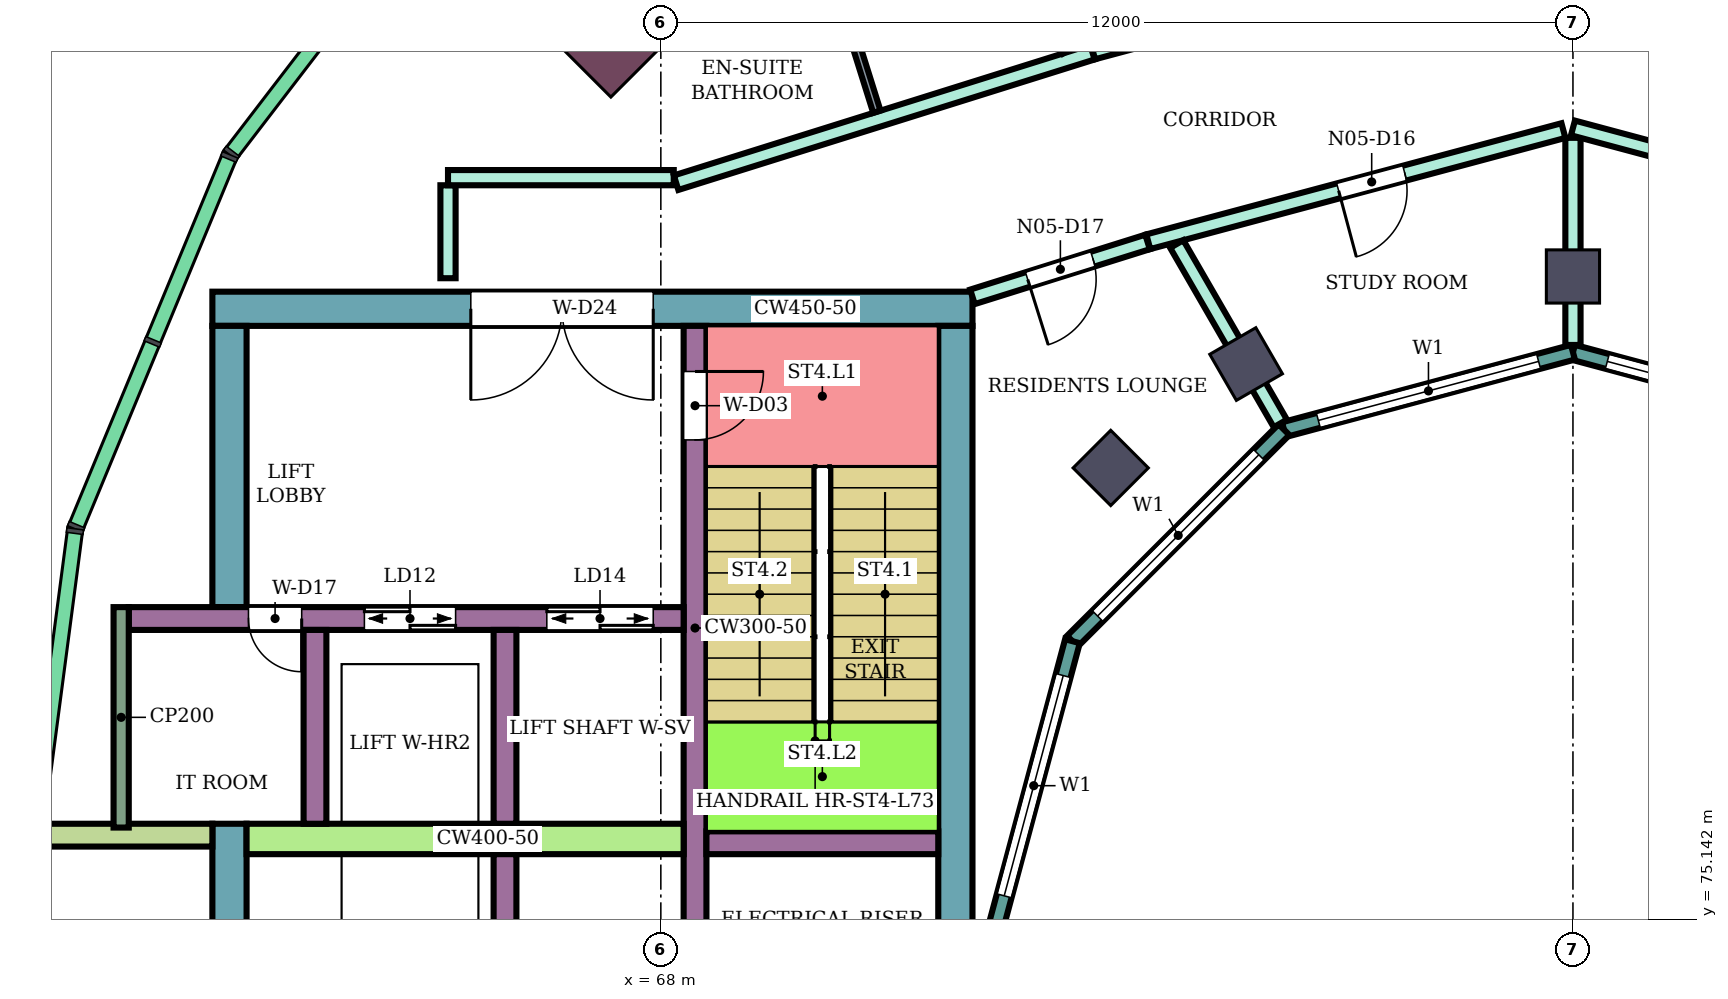
"""IFC4 building model, lengths in metres.
Left out: names, types, materials, properties, quantities, classifications, styles, units other than length and angle.
Written with IfcOpenShell. Run it as: python <this file> out.ifc"""

import sys

from ifc_helpers import new_model, si_unit, direction, frame, frame_2d, origin, origin_2d, place, context, subcontext, project, spatial, rectangle, extrude, element, fill, save


model = new_model("IFC4")
c1 = context("Model", 3, precision=1e-05, world=origin(), true_north=direction((0.0, 1.0)))
c2 = subcontext(c1, "Body", "Model", "MODEL_VIEW")
j1 = project(units=[si_unit("LENGTHUNIT", "METRE"), si_unit("PLANEANGLEUNIT", "RADIAN")], contexts=[c1])
p1 = place(None, origin())
s1 = spatial("IfcSite", under=j1, at=p1, CompositionType="ELEMENT")
p2 = place(p1, origin())
s2 = spatial("IfcBuilding", under=s1, at=p2, CompositionType="ELEMENT")
p3 = place(p2, frame((0.0, 0.0, 319.3)))
s3 = spatial("IfcBuildingStorey", under=s2, at=p3, CompositionType="ELEMENT", Elevation=319.3)
for number, where, z_axis, x_axis in (
    (1, (80.0, 83.6, 0.0), (0.0, 0.0, 1.0), (0.0, 1.0, 0.0)),
    (2, (75.7, 82.448, 0.0), (0.0, 0.0, 1.0), (-0.5, 0.866, 0.0)),
    (3, (73.919, 81.081, 0.0), (0.0, 0.0, 1.0), (-0.707, 0.707, 0.0)),
):
    element("IfcColumn", number, at=place(p3, frame(where, z_axis=z_axis, x_axis=x_axis)), inside=s3, PredefinedType="COLUMN", context=c2, shape_type="SweptSolid", body=[
        extrude(rectangle(XDim=0.7, YDim=0.7, at=origin_2d()), origin(), (0.0, 0.0, 1.0), 4.4),
    ])
p4 = place(p3, frame((67.767, 87.233, 0.0), z_axis=(0.0, 0.0, 1.0), x_axis=(-0.707106781187, 0.707106781187, 0.0)))
e4 = element("IfcColumn", 4, at=p4, inside=s3, PredefinedType="COLUMN", context=c2, shape_type="SweptSolid", body=[
    extrude(rectangle(XDim=1.2, YDim=2.4, at=origin_2d()), origin(), (0.0, 0.0, 1.0), 4.4),
])
p5 = place(p3, frame((72.1, 83.175, 0.0), z_axis=(0.0, 0.0, 1.0), x_axis=(-1.0, 0.0, 0.0)))
e5 = element("IfcWall", 5, at=p5, inside=s3, PredefinedType="SHEAR", context=c2, shape_type="SweptSolid", body=[
    extrude(rectangle(XDim=10.0, YDim=0.45, at=frame_2d((5.0, 0.0))), origin(), (0.0, 0.0, 1.0), 4.08),
])
p6 = place(p5, frame((4.2, 0.0, 0.0)))
e6 = element("IfcOpeningElement", 6, at=p6, cuts=e5, PredefinedType="OPENING", context=c2, shape_type="SweptSolid", body=[
    extrude(rectangle(XDim=2.4, YDim=2.4, at=frame_2d((1.2, 1.2))), frame((0.0, 0.235, 0.0), z_axis=(0.0, -1.0, 0.0), x_axis=(1.0, 0.0, 0.0)), (0.0, 0.0, 1.0), 0.47),
])
p7 = place(p3, frame((71.875, 82.95, 0.0), z_axis=(0.0, 0.0, 1.0), x_axis=(0.0, -1.0, 0.0)))
e7 = element("IfcWall", 7, at=p7, inside=s3, PredefinedType="SHEAR", context=c2, shape_type="SweptSolid", body=[
    extrude(rectangle(XDim=7.95, YDim=0.45, at=frame_2d((3.975, 0.0))), origin(), (0.0, 0.0, 1.0), 4.08),
])
p8 = place(p3, frame((62.325, 76.4, 0.0), z_axis=(0.0, 0.0, 1.0), x_axis=(0.0, -1.0, 0.0)))
e8 = element("IfcWall", 8, at=p8, inside=s3, PredefinedType="SHEAR", context=c2, shape_type="SweptSolid", body=[
    extrude(rectangle(XDim=9.35, YDim=0.45, at=frame_2d((4.675, 0.0))), origin(), (0.0, 0.0, 1.0), 4.08),
])
p9 = place(p3, frame((62.325, 82.95, 0.0), z_axis=(0.0, 0.0, 1.0), x_axis=(0.0, -1.0, 0.0)))
e9 = element("IfcWall", 9, at=p9, inside=s3, PredefinedType="SHEAR", context=c2, shape_type="SweptSolid", body=[
    extrude(rectangle(XDim=3.7, YDim=0.45, at=frame_2d((1.85, 0.0))), origin(), (0.0, 0.0, 1.0), 4.08),
])
p10 = place(p3, frame((68.45, 82.95, 0.0), z_axis=(0.0, 0.0, 1.0), x_axis=(0.0, -1.0, 0.0)))
e10 = element("IfcWall", 10, at=p10, inside=s3, PredefinedType="SHEAR", context=c2, shape_type="SweptSolid", body=[
    extrude(rectangle(XDim=7.95, YDim=0.3, at=frame_2d((3.975, 0.0))), origin(), (0.0, 0.0, 1.0), 4.08),
])
p11 = place(p10, frame((0.6, 0.0, 0.0)))
e11 = element("IfcOpeningElement", 11, at=p11, cuts=e10, PredefinedType="OPENING", context=c2, shape_type="SweptSolid", body=[
    extrude(rectangle(XDim=0.9, YDim=2.1, at=frame_2d((0.45, 1.05))), frame((0.0, 0.16, 0.0), z_axis=(0.0, -1.0, 0.0), x_axis=(1.0, 0.0, 0.0)), (0.0, 0.0, 1.0), 0.32),
])
p12 = place(p3, frame((71.65, 76.15, 0.0), z_axis=(0.0, 0.0, 1.0), x_axis=(-1.0, 0.0, 0.0)))
e12 = element("IfcWall", 12, at=p12, inside=s3, PredefinedType="SHEAR", context=c2, shape_type="SweptSolid", body=[
    extrude(rectangle(XDim=3.05, YDim=0.3, at=frame_2d((1.525, 0.0))), origin(), (0.0, 0.0, 1.0), 4.08),
])
p13 = place(p3, frame((68.3, 76.2, 0.0), z_axis=(0.0, 0.0, 1.0), x_axis=(-1.0, 0.0, 0.0)))
e13 = element("IfcWall", 13, at=p13, inside=s3, PredefinedType="SHEAR", context=c2, shape_type="SweptSolid", body=[
    extrude(rectangle(XDim=5.75, YDim=0.4, at=frame_2d((2.875, 0.0))), origin(), (0.0, 0.0, 1.0), 4.08),
])
p14 = place(p3, frame((68.3, 79.1, 0.0), z_axis=(0.0, 0.0, 1.0), x_axis=(-1.0, 0.0, 0.0)))
e14 = element("IfcWall", 14, at=p14, inside=s3, PredefinedType="SHEAR", context=c2, shape_type="SweptSolid", body=[
    extrude(rectangle(XDim=7.3, YDim=0.3, at=frame_2d((3.65, 0.0))), origin(), (0.0, 0.0, 1.0), 4.08),
])
p15 = place(p14, frame((0.4, 0.0, 0.0)))
e15 = element("IfcOpeningElement", 15, at=p15, cuts=e14, PredefinedType="OPENING", context=c2, shape_type="SweptSolid", body=[
    extrude(rectangle(XDim=1.4, YDim=2.1, at=frame_2d((0.7, 1.05))), frame((0.0, 0.16, 0.0), z_axis=(0.0, -1.0, 0.0), x_axis=(1.0, 0.0, 0.0)), (0.0, 0.0, 1.0), 0.32),
])
p16 = place(p14, frame((3.0, 0.0, 0.0)))
e16 = element("IfcOpeningElement", 16, at=p16, cuts=e14, PredefinedType="OPENING", context=c2, shape_type="SweptSolid", body=[
    extrude(rectangle(XDim=1.2, YDim=2.1, at=frame_2d((0.6, 1.05))), frame((0.0, 0.16, 0.0), z_axis=(0.0, -1.0, 0.0), x_axis=(1.0, 0.0, 0.0)), (0.0, 0.0, 1.0), 0.32),
])
p17 = place(p14, frame((5.025, 0.0, 0.0)))
e17 = element("IfcOpeningElement", 17, at=p17, cuts=e14, PredefinedType="OPENING", context=c2, shape_type="SweptSolid", body=[
    extrude(rectangle(XDim=0.7, YDim=2.1, at=frame_2d((0.35, 1.05))), frame((0.0, 0.16, 0.0), z_axis=(0.0, -1.0, 0.0), x_axis=(1.0, 0.0, 0.0)), (0.0, 0.0, 1.0), 0.32),
])
for number, where, z_axis, x_axis in (
    (18, (65.95, 76.0, 0.0), (0.0, 0.0, 1.0), (0.0, -1.0, 0.0)),
    (19, (65.95, 78.95, 0.0), (0.0, 0.0, 1.0), (0.0, -1.0, 0.0)),
    (20, (63.45, 78.95, 0.0), (0.0, 0.0, 1.0), (0.0, -1.0, 0.0)),
):
    element("IfcWall", number, at=place(p3, frame(where, z_axis=z_axis, x_axis=x_axis)), inside=s3, PredefinedType="SHEAR", context=c2, shape_type="SweptSolid", body=[
        extrude(rectangle(XDim=2.55, YDim=0.3, at=frame_2d((1.275, 0.0))), origin(), (0.0, 0.0, 1.0), 4.08),
    ])
p18 = place(p3, frame((62.1, 76.25, 0.0), z_axis=(0.0, 0.0, 1.0), x_axis=(-1.0, 0.0, 0.0)))
e21 = element("IfcWall", 21, at=p18, inside=s3, PredefinedType="NOTDEFINED", context=c2, shape_type="SweptSolid", body=[
    extrude(rectangle(XDim=2.416, YDim=0.3, at=frame_2d((1.208, 0.0))), origin(), (0.0, 0.0, 1.0), 4.4),
])
p19 = place(p3, frame((83.802, 81.585, 0.0), z_axis=(0.0, 0.0, 1.0), x_axis=(-0.965933654434, 0.258789828301, 0.0)))
e22 = element("IfcWall", 22, at=p19, inside=s3, PredefinedType="NOTDEFINED", context=c2, shape_type="SweptSolid", body=[
    extrude(rectangle(XDim=3.936, YDim=0.2, at=frame_2d((1.968, 0.0))), origin(), (0.0, 0.0, 1.0), 4.4),
])
p20 = place(p19, frame((0.468, 0.0, 0.9)))
e23 = element("IfcOpeningElement", 23, at=p20, cuts=e22, PredefinedType="OPENING", context=c2, shape_type="SweptSolid", body=[
    extrude(rectangle(XDim=3.0, YDim=2.3, at=frame_2d((1.5, 1.15))), frame((0.0, 0.11, 0.0), z_axis=(0.0, -1.0, 0.0), x_axis=(1.0, 0.0, 0.0)), (0.0, 0.0, 1.0), 0.22),
])
p21 = place(p3, frame((80.0, 82.604, 0.0), z_axis=(0.0, 0.0, 1.0), x_axis=(-0.965933654434, -0.258789828301, 0.0)))
e24 = element("IfcWall", 24, at=p21, inside=s3, PredefinedType="NOTDEFINED", context=c2, shape_type="SweptSolid", body=[
    extrude(rectangle(XDim=3.936, YDim=0.2, at=frame_2d((1.968, 0.0))), origin(), (0.0, 0.0, 1.0), 4.4),
])
p22 = place(p21, frame((0.468, 0.0, 0.9)))
e25 = element("IfcOpeningElement", 25, at=p22, cuts=e24, PredefinedType="OPENING", context=c2, shape_type="SweptSolid", body=[
    extrude(rectangle(XDim=3.0, YDim=2.3, at=frame_2d((1.5, 1.15))), frame((0.0, 0.11, 0.0), z_axis=(0.0, -1.0, 0.0), x_axis=(1.0, 0.0, 0.0)), (0.0, 0.0, 1.0), 0.22),
])
p23 = place(p3, frame((76.198, 81.585, 0.0), z_axis=(0.0, 0.0, 1.0), x_axis=(-0.707106781187, -0.707106781187, 0.0)))
e26 = element("IfcWall", 26, at=p23, inside=s3, PredefinedType="NOTDEFINED", context=c2, shape_type="SweptSolid", body=[
    extrude(rectangle(XDim=3.936, YDim=0.2, at=frame_2d((1.968, 0.0))), origin(), (0.0, 0.0, 1.0), 4.4),
])
p24 = place(p23, frame((0.468, 0.0, 0.9)))
e27 = element("IfcOpeningElement", 27, at=p24, cuts=e26, PredefinedType="OPENING", context=c2, shape_type="SweptSolid", body=[
    extrude(rectangle(XDim=3.0, YDim=2.3, at=frame_2d((1.5, 1.15))), frame((0.0, 0.11, 0.0), z_axis=(0.0, -1.0, 0.0), x_axis=(1.0, 0.0, 0.0)), (0.0, 0.0, 1.0), 0.22),
])
p25 = place(p3, frame((73.415, 78.802, 0.0), z_axis=(0.0, 0.0, 1.0), x_axis=(-0.258789828301, -0.965933654434, 0.0)))
e28 = element("IfcWall", 28, at=p25, inside=s3, PredefinedType="NOTDEFINED", context=c2, shape_type="SweptSolid", body=[
    extrude(rectangle(XDim=3.936, YDim=0.2, at=frame_2d((1.968, 0.0))), origin(), (0.0, 0.0, 1.0), 4.4),
])
p26 = place(p25, frame((0.468, 0.0, 0.9)))
e29 = element("IfcOpeningElement", 29, at=p26, cuts=e28, PredefinedType="OPENING", context=c2, shape_type="SweptSolid", body=[
    extrude(rectangle(XDim=3.0, YDim=2.3, at=frame_2d((1.5, 1.15))), frame((0.0, 0.11, 0.0), z_axis=(0.0, -1.0, 0.0), x_axis=(1.0, 0.0, 0.0)), (0.0, 0.0, 1.0), 0.22),
])
p27 = place(p3, frame((65.2, 83.577, 0.0), z_axis=(0.0, 0.0, 1.0), x_axis=(0.0, 1.0, 0.0)))
e30 = element("IfcWall", 30, at=p27, inside=s3, PredefinedType="PARTITIONING", context=c2, shape_type="SweptSolid", body=[
    extrude(rectangle(XDim=1.223, YDim=0.2, at=frame_2d((0.612, 0.0))), origin(), (0.0, 0.0, 1.0), 3.95),
])
p28 = place(p3, frame((65.2, 84.9, 0.0), z_axis=(0.0, 0.0, 1.0), x_axis=(1.0, 0.0, 0.0)))
e31 = element("IfcWall", 31, at=p28, inside=s3, PredefinedType="PARTITIONING", context=c2, shape_type="SweptSolid", body=[
    extrude(rectangle(XDim=2.97, YDim=0.2, at=frame_2d((1.485, 0.0))), origin(), (0.0, 0.0, 1.0), 3.95),
])
p29 = place(p3, frame((68.201, 84.834, 0.0), z_axis=(0.0, 0.0, 1.0), x_axis=(0.954232917497, 0.29906443982, 0.0)))
e32 = element("IfcWall", 32, at=p29, inside=s3, PredefinedType="PARTITIONING", context=c2, shape_type="SweptSolid", body=[
    extrude(rectangle(XDim=5.74, YDim=0.2, at=frame_2d((2.87, 0.0))), origin(), (0.0, 0.0, 1.0), 3.95),
])
p30 = place(p3, frame((72.1, 83.332, 0.0), z_axis=(0.0, 0.0, 1.0), x_axis=(0.954233106619, 0.299063836383, 0.0)))
e33 = element("IfcWall", 33, at=p30, inside=s3, PredefinedType="PARTITIONING", context=c2, shape_type="SweptSolid", body=[
    extrude(rectangle(XDim=2.414, YDim=0.2, at=frame_2d((1.207, 0.0))), origin(), (0.0, 0.0, 1.0), 3.95),
])
p31 = place(p30, frame((0.762, 0.0, 0.0)))
e34 = element("IfcOpeningElement", 34, at=p31, cuts=e33, PredefinedType="OPENING", context=c2, shape_type="SweptSolid", body=[
    extrude(rectangle(XDim=0.9, YDim=2.1, at=frame_2d((0.45, 1.05))), frame((0.0, 0.11, 0.0), z_axis=(0.0, -1.0, 0.0), x_axis=(1.0, 0.0, 0.0)), (0.0, 0.0, 1.0), 0.22),
])
p32 = place(p3, frame((73.687, 86.554, 0.0), z_axis=(0.0, 0.0, 1.0), x_axis=(0.96595903825, 0.258695064551, 0.0)))
e35 = element("IfcWall", 35, at=p32, inside=s3, PredefinedType="PARTITIONING", context=c2, shape_type="SweptSolid", body=[
    extrude(rectangle(XDim=6.446, YDim=0.2, at=frame_2d((3.223, 0.0))), origin(), (0.0, 0.0, 1.0), 3.95),
])
p33 = place(p32, frame((3.638, 0.0, 0.0)))
e36 = element("IfcOpeningElement", 36, at=p33, cuts=e35, PredefinedType="OPENING", context=c2, shape_type="SweptSolid", body=[
    extrude(rectangle(XDim=1.0, YDim=2.1, at=frame_2d((0.5, 1.05))), frame((0.0, 0.11, 0.0), z_axis=(0.0, -1.0, 0.0), x_axis=(1.0, 0.0, 0.0)), (0.0, 0.0, 1.0), 0.22),
])
p34 = place(p3, frame((74.413, 84.057, 0.0), z_axis=(0.0, 0.0, 1.0), x_axis=(0.965972135939, 0.258646153246, 0.0)))
e37 = element("IfcWall", 37, at=p34, inside=s3, PredefinedType="PARTITIONING", context=c2, shape_type="SweptSolid", body=[
    extrude(rectangle(XDim=5.654, YDim=0.2, at=frame_2d((2.827, 0.0))), origin(), (0.0, 0.0, 1.0), 3.95),
])
p35 = place(p34, frame((2.593, 0.0, 0.0)))
e38 = element("IfcOpeningElement", 38, at=p35, cuts=e37, PredefinedType="OPENING", context=c2, shape_type="SweptSolid", body=[
    extrude(rectangle(XDim=0.9, YDim=2.1, at=frame_2d((0.45, 1.05))), frame((0.0, 0.11, 0.0), z_axis=(0.0, -1.0, 0.0), x_axis=(1.0, 0.0, 0.0)), (0.0, 0.0, 1.0), 0.22),
])
p36 = place(p3, frame((74.787, 84.027, 0.0), z_axis=(0.0, 0.0, 1.0), x_axis=(0.500079107518, -0.86597972622, 0.0)))
e39 = element("IfcWall", 39, at=p36, inside=s3, PredefinedType="PARTITIONING", context=c2, shape_type="SweptSolid", body=[
    extrude(rectangle(XDim=2.726, YDim=0.2, at=frame_2d((1.363, 0.0))), origin(), (0.0, 0.0, 1.0), 3.95),
])
p37 = place(p3, frame((80.0, 82.699, 0.0), z_axis=(0.0, 0.0, 1.0), x_axis=(0.0, 1.0, 0.0)))
e40 = element("IfcWall", 40, at=p37, inside=s3, PredefinedType="PARTITIONING", context=c2, shape_type="SweptSolid", body=[
    extrude(rectangle(XDim=2.725, YDim=0.2, at=frame_2d((1.363, 0.0))), origin(), (0.0, 0.0, 1.0), 3.95),
])
p38 = place(p3, frame((80.0, 85.554, 0.0), z_axis=(0.0, 0.0, 1.0), x_axis=(0.965928989968, -0.258807237802, 0.0)))
e41 = element("IfcWall", 41, at=p38, inside=s3, PredefinedType="PARTITIONING", context=c2, shape_type="SweptSolid", body=[
    extrude(rectangle(XDim=5.774, YDim=0.2, at=frame_2d((2.887, 0.0))), origin(), (0.0, 0.0, 1.0), 3.95),
])
p39 = place(p38, frame((2.292, 0.0, 0.0)))
e42 = element("IfcOpeningElement", 42, at=p39, cuts=e41, PredefinedType="OPENING", context=c2, shape_type="SweptSolid", body=[
    extrude(rectangle(XDim=0.9, YDim=2.1, at=frame_2d((0.45, 1.05))), frame((0.0, 0.11, 0.0), z_axis=(0.0, -1.0, 0.0), x_axis=(1.0, 0.0, 0.0)), (0.0, 0.0, 1.0), 0.22),
])
p40 = place(p3, frame((80.0, 88.247, 0.0), z_axis=(0.0, 0.0, 1.0), x_axis=(0.965807659316, -0.259259648244, 0.0)))
e43 = element("IfcWall", 43, at=p40, inside=s3, PredefinedType="PARTITIONING", context=c2, shape_type="SweptSolid", body=[
    extrude(rectangle(XDim=6.526, YDim=0.2, at=frame_2d((3.263, 0.0))), origin(), (0.0, 0.0, 1.0), 3.95),
])
p41 = place(p40, frame((1.93, 0.0, 0.0)))
e44 = element("IfcOpeningElement", 44, at=p41, cuts=e43, PredefinedType="OPENING", context=c2, shape_type="SweptSolid", body=[
    extrude(rectangle(XDim=1.0, YDim=2.1, at=frame_2d((0.5, 1.05))), frame((0.0, 0.11, 0.0), z_axis=(0.0, -1.0, 0.0), x_axis=(1.0, 0.0, 0.0)), (0.0, 0.0, 1.0), 0.22),
])
p42 = place(p3, frame((69.69, 89.44, 0.0), z_axis=(0.0, 0.0, 1.0), x_axis=(0.299260814267, -0.954171349939, 0.0)))
e45 = element("IfcWall", 45, at=p42, inside=s3, PredefinedType="PARTITIONING", context=c2, shape_type="SweptSolid", body=[
    extrude(rectangle(XDim=3.849, YDim=0.1, at=frame_2d((1.925, 0.0))), origin(), (0.0, 0.0, 1.0), 3.95),
])
p43 = place(p3, frame((69.855, 92.579, 0.0), z_axis=(0.0, 0.0, 1.0), x_axis=(0.499801463163, -0.866139998742, 0.0)))
e46 = element("IfcWall", 46, at=p43, inside=s3, PredefinedType="PARTITIONING", context=c2, shape_type="SweptSolid", body=[
    extrude(rectangle(XDim=6.955, YDim=0.1, at=frame_2d((3.478, 0.0))), origin(), (0.0, 0.0, 1.0), 3.95),
])
p44 = place(p43, frame((1.029, 0.0, 0.0)))
e47 = element("IfcOpeningElement", 47, at=p44, cuts=e46, PredefinedType="OPENING", context=c2, shape_type="SweptSolid", body=[
    extrude(rectangle(XDim=0.9, YDim=2.1, at=frame_2d((0.45, 1.05))), frame((0.0, 0.06, 0.0), z_axis=(0.0, -1.0, 0.0), x_axis=(1.0, 0.0, 0.0)), (0.0, 0.0, 1.0), 0.12),
])
p45 = place(p3, frame((60.9, 79.25, 0.0), z_axis=(0.0, 0.0, 1.0), x_axis=(0.0, -1.0, 0.0)))
e48 = element("IfcWall", 48, at=p45, inside=s3, PredefinedType="PARTITIONING", context=c2, shape_type="SweptSolid", body=[
    extrude(rectangle(XDim=2.9, YDim=0.2, at=frame_2d((1.45, 0.0))), origin(), (0.0, 0.0, 1.0), 4.08),
])
p46 = place(p20, origin())
e49 = element("IfcWindow", 49, at=p46, inside=s3, PartitioningType="SINGLE_PANEL", PredefinedType="WINDOW", context=c2, shape_type="SweptSolid", body=[
    extrude(rectangle(XDim=3.0, YDim=2.3, at=frame_2d((1.5, 1.15))), frame((0.0, 0.03, 0.0), z_axis=(0.0, -1.0, 0.0), x_axis=(1.0, 0.0, 0.0)), (0.0, 0.0, 1.0), 0.06),
])
fill(e23, e49)
p47 = place(p22, origin())
e50 = element("IfcWindow", 50, at=p47, inside=s3, PartitioningType="SINGLE_PANEL", PredefinedType="WINDOW", context=c2, shape_type="SweptSolid", body=[
    extrude(rectangle(XDim=3.0, YDim=2.3, at=frame_2d((1.5, 1.15))), frame((0.0, 0.03, 0.0), z_axis=(0.0, -1.0, 0.0), x_axis=(1.0, 0.0, 0.0)), (0.0, 0.0, 1.0), 0.06),
])
fill(e25, e50)
p48 = place(p24, origin())
e51 = element("IfcWindow", 51, at=p48, inside=s3, PartitioningType="SINGLE_PANEL", PredefinedType="WINDOW", context=c2, shape_type="SweptSolid", body=[
    extrude(rectangle(XDim=3.0, YDim=2.3, at=frame_2d((1.5, 1.15))), frame((0.0, 0.03, 0.0), z_axis=(0.0, -1.0, 0.0), x_axis=(1.0, 0.0, 0.0)), (0.0, 0.0, 1.0), 0.06),
])
fill(e27, e51)
p49 = place(p26, origin())
e52 = element("IfcWindow", 52, at=p49, inside=s3, PartitioningType="SINGLE_PANEL", PredefinedType="WINDOW", context=c2, shape_type="SweptSolid", body=[
    extrude(rectangle(XDim=3.0, YDim=2.3, at=frame_2d((1.5, 1.15))), frame((0.0, 0.03, 0.0), z_axis=(0.0, -1.0, 0.0), x_axis=(1.0, 0.0, 0.0)), (0.0, 0.0, 1.0), 0.06),
])
fill(e29, e52)
p50 = place(p35, frame((0.9, 0.0, 0.0), z_axis=(0.0, 0.0, 1.0), x_axis=(-1.0, 0.0, 0.0)))
e53 = element("IfcDoor", 53, at=p50, inside=s3, OperationType="SINGLE_SWING_RIGHT", PredefinedType="DOOR", context=c2, shape_type="SweptSolid", body=[
    extrude(rectangle(XDim=0.9, YDim=2.1, at=frame_2d((0.45, 1.05))), frame((0.0, 0.025, 0.0), z_axis=(0.0, -1.0, 0.0), x_axis=(1.0, 0.0, 0.0)), (0.0, 0.0, 1.0), 0.05),
])
fill(e38, e53)
p51 = place(p31, frame((0.9, 0.0, 0.0), z_axis=(0.0, 0.0, 1.0), x_axis=(-1.0, 0.0, 0.0)))
e54 = element("IfcDoor", 54, at=p51, inside=s3, OperationType="SINGLE_SWING_RIGHT", PredefinedType="DOOR", context=c2, shape_type="SweptSolid", body=[
    extrude(rectangle(XDim=0.9, YDim=2.1, at=frame_2d((0.45, 1.05))), frame((0.0, 0.025, 0.0), z_axis=(0.0, -1.0, 0.0), x_axis=(1.0, 0.0, 0.0)), (0.0, 0.0, 1.0), 0.05),
])
fill(e34, e54)
p52 = place(p11, origin())
e55 = element("IfcDoor", 55, at=p52, inside=s3, OperationType="SINGLE_SWING_LEFT", PredefinedType="DOOR", context=c2, shape_type="SweptSolid", body=[
    extrude(rectangle(XDim=0.9, YDim=2.1, at=frame_2d((0.45, 1.05))), frame((0.0, 0.025, 0.0), z_axis=(0.0, -1.0, 0.0), x_axis=(1.0, 0.0, 0.0)), (0.0, 0.0, 1.0), 0.05),
])
fill(e11, e55)
p53 = place(p15, origin())
e56 = element("IfcDoor", 56, at=p53, inside=s3, OperationType="DOUBLE_DOOR_SLIDING", PredefinedType="DOOR", context=c2, shape_type="SweptSolid", body=[
    extrude(rectangle(XDim=1.4, YDim=2.1, at=frame_2d((0.7, 1.05))), frame((0.0, 0.025, 0.0), z_axis=(0.0, -1.0, 0.0), x_axis=(1.0, 0.0, 0.0)), (0.0, 0.0, 1.0), 0.05),
])
fill(e15, e56)
p54 = place(p16, origin())
e57 = element("IfcDoor", 57, at=p54, inside=s3, OperationType="DOUBLE_DOOR_SLIDING", PredefinedType="DOOR", context=c2, shape_type="SweptSolid", body=[
    extrude(rectangle(XDim=1.2, YDim=2.1, at=frame_2d((0.6, 1.05))), frame((0.0, 0.025, 0.0), z_axis=(0.0, -1.0, 0.0), x_axis=(1.0, 0.0, 0.0)), (0.0, 0.0, 1.0), 0.05),
])
fill(e16, e57)
p55 = place(p17, origin())
e58 = element("IfcDoor", 58, at=p55, inside=s3, OperationType="SINGLE_SWING_LEFT", PredefinedType="DOOR", context=c2, shape_type="SweptSolid", body=[
    extrude(rectangle(XDim=0.7, YDim=2.1, at=frame_2d((0.35, 1.05))), frame((0.0, 0.025, 0.0), z_axis=(0.0, -1.0, 0.0), x_axis=(1.0, 0.0, 0.0)), (0.0, 0.0, 1.0), 0.05),
])
fill(e17, e58)
p56 = place(p6, origin())
e59 = element("IfcDoor", 59, at=p56, inside=s3, OperationType="DOUBLE_DOOR_SINGLE_SWING", PredefinedType="DOOR", context=c2, shape_type="SweptSolid", body=[
    extrude(rectangle(XDim=2.4, YDim=2.4, at=frame_2d((1.2, 1.2))), frame((0.0, 0.025, 0.0), z_axis=(0.0, -1.0, 0.0), x_axis=(1.0, 0.0, 0.0)), (0.0, 0.0, 1.0), 0.05),
])
fill(e6, e59)
save(model, sys.argv[1])
